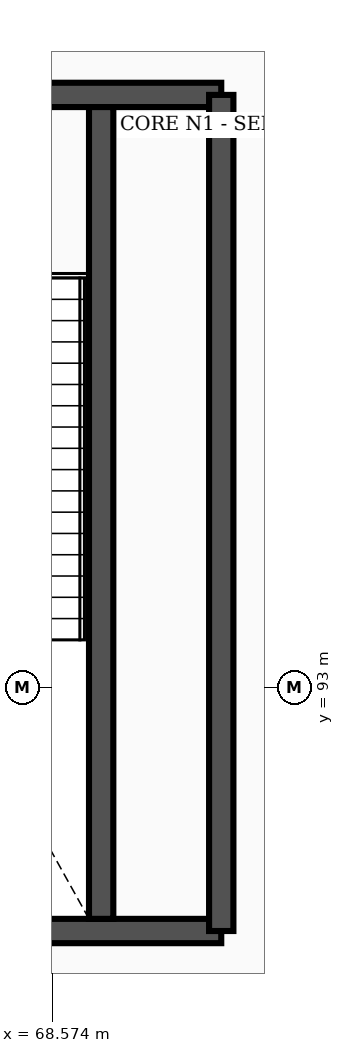
"""IFC4 building model, lengths in metres.
Left out: names, types, materials, properties, quantities, classifications, styles, units other than length and angle.
Written with IfcOpenShell. Run it as: python <this file> out.ifc"""

import sys

from ifc_helpers import new_model, si_unit, direction, frame, frame_2d, origin, place, context, subcontext, project, spatial, rectangle, extrude, element, save


model = new_model("IFC4")
c1 = context("Model", 3, precision=1e-05, world=origin(), true_north=direction((0.0, 1.0)))
c2 = subcontext(c1, "Body", "Model", "MODEL_VIEW")
j1 = project(units=[si_unit("LENGTHUNIT", "METRE"), si_unit("PLANEANGLEUNIT", "RADIAN")], contexts=[c1])
p1 = place(None, origin())
s1 = spatial("IfcSite", under=j1, at=p1, CompositionType="ELEMENT")
p2 = place(p1, origin())
s2 = spatial("IfcBuilding", under=s1, at=p2, CompositionType="ELEMENT")
p3 = place(p2, origin())
s3 = spatial("IfcBuildingStorey", under=s2, at=p3, CompositionType="ELEMENT", Elevation=0.0)
for number, where, z_axis, x_axis in (
    (1, (64.2, 89.8, 0.0), (0.0, 0.0, 1.0), (1.0, 0.0, 0.0)),
    (2, (64.2, 100.8, 0.0), (0.0, 0.0, 1.0), (1.0, 0.0, 0.0)),
):
    element("IfcWall", number, at=place(p3, frame(where, z_axis=z_axis, x_axis=x_axis)), inside=s3, PredefinedType="SHEAR", context=c2, shape_type="SweptSolid", body=[
        extrude(rectangle(XDim=6.6, YDim=0.32, at=frame_2d((3.3, 0.0))), origin(), (0.0, 0.0, 1.0), 5.75),
    ])
p4 = place(p3, frame((70.8, 89.8, 0.0), z_axis=(0.0, 0.0, 1.0), x_axis=(0.0, 1.0, 0.0)))
e3 = element("IfcWall", 3, at=p4, inside=s3, PredefinedType="SHEAR", context=c2, shape_type="SweptSolid", body=[
    extrude(rectangle(XDim=11.0, YDim=0.32, at=frame_2d((5.5, 0.0))), origin(), (0.0, 0.0, 1.0), 5.75),
])
p5 = place(p3, frame((69.22, 89.96, 0.0), z_axis=(0.0, 0.0, 1.0), x_axis=(0.0, 1.0, 0.0)))
e4 = element("IfcWall", 4, at=p5, inside=s3, PredefinedType="SHEAR", context=c2, shape_type="SweptSolid", body=[
    extrude(rectangle(XDim=10.68, YDim=0.32, at=frame_2d((5.34, 0.0))), origin(), (0.0, 0.0, 1.0), 5.75),
])
save(model, sys.argv[1])
